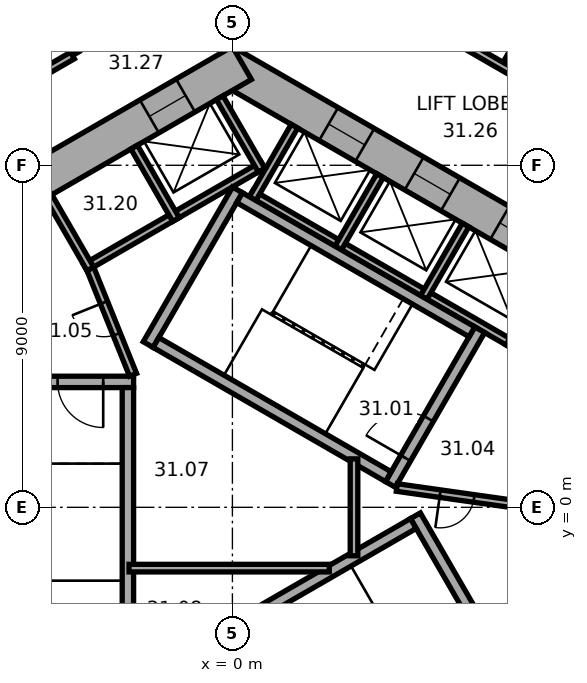
"""IFC4 building model, lengths in metres.
Left out: names, types, materials, properties, quantities, classifications, styles, units other than length and angle.
Written with IfcOpenShell. Run it as: python <this file> out.ifc"""

import sys

from ifc_helpers import new_model, si_unit, direction, frame, frame_2d, origin, place, context, subcontext, project, spatial, rectangle, extrude, element, fill, save


model = new_model("IFC4")
c1 = context("Model", 3, precision=1e-05, world=origin(), true_north=direction((0.0, 1.0)))
c2 = subcontext(c1, "Body", "Model", "MODEL_VIEW")
j1 = project(units=[si_unit("LENGTHUNIT", "METRE"), si_unit("PLANEANGLEUNIT", "RADIAN")], contexts=[c1])
p1 = place(None, origin())
s1 = spatial("IfcSite", under=j1, at=p1, CompositionType="ELEMENT")
p2 = place(p1, origin())
s2 = spatial("IfcBuilding", under=s1, at=p2, CompositionType="ELEMENT")
p3 = place(p2, frame((0.0, 0.0, 128.1)))
s3 = spatial("IfcBuildingStorey", under=s2, at=p3, CompositionType="ELEMENT", Elevation=128.1)
p4 = place(p3, frame((10.25, 5.629, 0.0), z_axis=(0.0, 0.0, 1.0), x_axis=(-0.866022616891, 0.50000482701, 0.0)))
e1 = element("IfcWall", 1, at=p4, inside=s3, PredefinedType="SHEAR", context=c2, shape_type="SweptSolid", body=[
    extrude(rectangle(XDim=12.125, YDim=1.0, at=frame_2d((6.062, 0.0))), origin(), (0.0, 0.0, 1.0), 3.7),
])
p5 = place(p4, frame((2.612, 0.0, 0.0)))
e2 = element("IfcOpeningElement", 2, at=p5, cuts=e1, PredefinedType="OPENING", context=c2, shape_type="SweptSolid", body=[
    extrude(rectangle(XDim=1.1, YDim=2.1, at=frame_2d((0.55, 1.05))), frame((0.0, 0.51, 0.0), z_axis=(0.0, -1.0, 0.0), x_axis=(1.0, 0.0, 0.0)), (0.0, 0.0, 1.0), 1.02),
])
p6 = place(p4, frame((5.212, 0.0, 0.0)))
e3 = element("IfcOpeningElement", 3, at=p6, cuts=e1, PredefinedType="OPENING", context=c2, shape_type="SweptSolid", body=[
    extrude(rectangle(XDim=1.1, YDim=2.1, at=frame_2d((0.55, 1.05))), frame((0.0, 0.51, 0.0), z_axis=(0.0, -1.0, 0.0), x_axis=(1.0, 0.0, 0.0)), (0.0, 0.0, 1.0), 1.02),
])
p7 = place(p4, frame((7.812, 0.0, 0.0)))
e4 = element("IfcOpeningElement", 4, at=p7, cuts=e1, PredefinedType="OPENING", context=c2, shape_type="SweptSolid", body=[
    extrude(rectangle(XDim=1.1, YDim=2.1, at=frame_2d((0.55, 1.05))), frame((0.0, 0.51, 0.0), z_axis=(0.0, -1.0, 0.0), x_axis=(1.0, 0.0, 0.0)), (0.0, 0.0, 1.0), 1.02),
])
p8 = place(p3, frame((0.25, 11.691, 0.0), z_axis=(0.0, 0.0, 1.0), x_axis=(-0.866022616891, -0.50000482701, 0.0)))
e5 = element("IfcWall", 5, at=p8, inside=s3, PredefinedType="SHEAR", context=c2, shape_type="SweptSolid", body=[
    extrude(rectangle(XDim=12.125, YDim=1.0, at=frame_2d((6.062, 0.0))), origin(), (0.0, 0.0, 1.0), 3.7),
])
p9 = place(p8, frame((6.262, 0.0, 0.0)))
e6 = element("IfcOpeningElement", 6, at=p9, cuts=e5, PredefinedType="OPENING", context=c2, shape_type="SweptSolid", body=[
    extrude(rectangle(XDim=1.5, YDim=2.1, at=frame_2d((0.75, 1.05))), frame((0.0, 0.51, 0.0), z_axis=(0.0, -1.0, 0.0), x_axis=(1.0, 0.0, 0.0)), (0.0, 0.0, 1.0), 1.02),
])
p10 = place(p8, frame((1.712, 0.0, 0.0)))
e7 = element("IfcOpeningElement", 7, at=p10, cuts=e5, PredefinedType="OPENING", context=c2, shape_type="SweptSolid", body=[
    extrude(rectangle(XDim=1.1, YDim=2.1, at=frame_2d((0.55, 1.05))), frame((0.0, 0.51, 0.0), z_axis=(0.0, -1.0, 0.0), x_axis=(1.0, 0.0, 0.0)), (0.0, 0.0, 1.0), 1.02),
])
p11 = place(p3, frame((7.424, 4.259, 0.0), z_axis=(0.0, 0.0, 1.0), x_axis=(-0.866026010844, 0.49999894854, 0.0)))
e8 = element("IfcWall", 8, at=p11, inside=s3, PredefinedType="PARTITIONING", context=c2, shape_type="SweptSolid", body=[
    extrude(rectangle(XDim=8.0, YDim=0.2, at=frame_2d((4.0, 0.0))), origin(), (0.0, 0.0, 1.0), 3.42),
])
for number, where, z_axis, x_axis in (
    (9, (7.287, 4.222, 0.0), (0.0, 0.0, 1.0), (0.5, 0.866, 0.0)),
    (10, (5.036, 5.522, 0.0), (0.0, 0.0, 1.0), (0.5, 0.866, 0.0)),
    (11, (2.784, 6.822, 0.0), (0.0, 0.0, 1.0), (0.5, 0.866, 0.0)),
    (12, (0.532, 8.122, 0.0), (0.0, 0.0, 1.0), (0.5, 0.866, 0.0)),
):
    element("IfcWall", number, at=place(p3, frame(where, z_axis=z_axis, x_axis=x_axis)), inside=s3, PredefinedType="PARTITIONING", context=c2, shape_type="SweptSolid", body=[
        extrude(rectangle(XDim=2.2, YDim=0.2, at=frame_2d((1.1, 0.0))), origin(), (0.0, 0.0, 1.0), 3.42),
    ])
p12 = place(p3, frame((0.803, 9.009, 0.0), z_axis=(0.0, 0.0, 1.0), x_axis=(-0.866028230842, -0.499995103361, 0.0)))
e13 = element("IfcWall", 13, at=p12, inside=s3, PredefinedType="PARTITIONING", context=c2, shape_type="SweptSolid", body=[
    extrude(rectangle(XDim=5.4, YDim=0.2, at=frame_2d((2.7, 0.0))), origin(), (0.0, 0.0, 1.0), 3.42),
])
p13 = place(p3, frame((0.767, 8.872, 0.0), z_axis=(0.0, 0.0, 1.0), x_axis=(-0.499994660107, 0.866028486751, 0.0)))
e14 = element("IfcWall", 14, at=p13, inside=s3, PredefinedType="PARTITIONING", context=c2, shape_type="SweptSolid", body=[
    extrude(rectangle(XDim=2.2, YDim=0.2, at=frame_2d((1.1, 0.0))), origin(), (0.0, 0.0, 1.0), 3.42),
])
for number, where, z_axis, x_axis in (
    (15, (-1.485, 7.572, 0.0), (0.0, 0.0, 1.0), (-0.5, 0.866, 0.0)),
    (16, (-3.737, 6.272, 0.0), (0.0, 0.0, 1.0), (-0.5, 0.866, 0.0)),
):
    element("IfcWall", number, at=place(p3, frame(where, z_axis=z_axis, x_axis=x_axis)), inside=s3, PredefinedType="PARTITIONING", context=c2, shape_type="SweptSolid", body=[
        extrude(rectangle(XDim=2.2, YDim=0.2, at=frame_2d((1.1, 0.0))), origin(), (0.0, 0.0, 1.0), 3.42),
    ])
p14 = place(p3, frame((4.158, 0.602, 0.0), z_axis=(0.0, 0.0, 1.0), x_axis=(0.499977259774, 0.866038532462, 0.0)))
e17 = element("IfcWall", 17, at=p14, inside=s3, PredefinedType="SHEAR", context=c2, shape_type="SweptSolid", body=[
    extrude(rectangle(XDim=4.7, YDim=0.3, at=frame_2d((2.35, 0.0))), origin(), (0.0, 0.0, 1.0), 3.42),
])
p15 = place(p14, frame((0.8, 0.0, 0.0)))
e18 = element("IfcOpeningElement", 18, at=p15, cuts=e17, PredefinedType="OPENING", context=c2, shape_type="SweptSolid", body=[
    extrude(rectangle(XDim=1.2, YDim=2.1, at=frame_2d((0.6, 1.05))), frame((0.0, 0.16, 0.0), z_axis=(0.0, -1.0, 0.0), x_axis=(1.0, 0.0, 0.0)), (0.0, 0.0, 1.0), 0.32),
])
p16 = place(p3, frame((-2.216, 4.282, 0.0), z_axis=(0.0, 0.0, 1.0), x_axis=(0.499977259774, 0.866038532462, 0.0)))
e19 = element("IfcWall", 19, at=p16, inside=s3, PredefinedType="SHEAR", context=c2, shape_type="SweptSolid", body=[
    extrude(rectangle(XDim=4.7, YDim=0.3, at=frame_2d((2.35, 0.0))), origin(), (0.0, 0.0, 1.0), 3.42),
])
for number, where, z_axis, x_axis in (
    (20, (4.103, 0.807, 0.0), (0.0, 0.0, 1.0), (-0.866, 0.5, 0.0)),
    (21, (6.303, 4.617, 0.0), (0.0, 0.0, 1.0), (-0.866, 0.5, 0.0)),
):
    element("IfcWall", number, at=place(p3, frame(where, z_axis=z_axis, x_axis=x_axis)), inside=s3, PredefinedType="SHEAR", context=c2, shape_type="SweptSolid", body=[
        extrude(rectangle(XDim=7.06, YDim=0.3, at=frame_2d((3.53, 0.0))), origin(), (0.0, 0.0, 1.0), 3.42),
    ])
p17 = place(p3, frame((-2.6, 3.3, 0.0), z_axis=(0.0, 0.0, 1.0), x_axis=(-1.0, 0.0, 0.0)))
e22 = element("IfcWall", 22, at=p17, inside=s3, PredefinedType="SHEAR", context=c2, shape_type="SweptSolid", body=[
    extrude(rectangle(XDim=4.7, YDim=0.3, at=frame_2d((2.35, 0.0))), origin(), (0.0, 0.0, 1.0), 3.42),
])
p18 = place(p17, frame((0.8, 0.0, 0.0)))
e23 = element("IfcOpeningElement", 23, at=p18, cuts=e22, PredefinedType="OPENING", context=c2, shape_type="SweptSolid", body=[
    extrude(rectangle(XDim=1.2, YDim=2.1, at=frame_2d((0.6, 1.05))), frame((0.0, 0.16, 0.0), z_axis=(0.0, -1.0, 0.0), x_axis=(1.0, 0.0, 0.0)), (0.0, 0.0, 1.0), 0.32),
])
p19 = place(p3, frame((-2.75, 3.15, 0.0), z_axis=(0.0, 0.0, 1.0), x_axis=(0.0, -1.0, 0.0)))
e24 = element("IfcWall", 24, at=p19, inside=s3, PredefinedType="SHEAR", context=c2, shape_type="SweptSolid", body=[
    extrude(rectangle(XDim=7.06, YDim=0.3, at=frame_2d((3.53, 0.0))), origin(), (0.0, 0.0, 1.0), 3.42),
])
p20 = place(p3, frame((4.816, -0.222, 0.0), z_axis=(0.0, 0.0, 1.0), x_axis=(0.499977259774, -0.866038532462, 0.0)))
e25 = element("IfcWall", 25, at=p20, inside=s3, PredefinedType="SHEAR", context=c2, shape_type="SweptSolid", body=[
    extrude(rectangle(XDim=4.7, YDim=0.3, at=frame_2d((2.35, 0.0))), origin(), (0.0, 0.0, 1.0), 3.42),
])
p21 = place(p3, frame((-1.353, -3.957, 0.0), z_axis=(0.0, 0.0, 1.0), x_axis=(0.866027801685, 0.499995846692, 0.0)))
e26 = element("IfcWall", 26, at=p21, inside=s3, PredefinedType="SHEAR", context=c2, shape_type="SweptSolid", body=[
    extrude(rectangle(XDim=7.06, YDim=0.3, at=frame_2d((3.53, 0.0))), origin(), (0.0, 0.0, 1.0), 3.42),
])
p22 = place(p3, frame((4.327, 0.521, 0.0), z_axis=(0.0, 0.0, 1.0), x_axis=(0.990124376366, -0.14019172346, 0.0)))
e27 = element("IfcWall", 27, at=p22, inside=s3, PredefinedType="PARTITIONING", context=c2, shape_type="SweptSolid", body=[
    extrude(rectangle(XDim=3.002, YDim=0.2, at=frame_2d((1.501, 0.0))), origin(), (0.0, 0.0, 1.0), 3.42),
])
p23 = place(p22, frame((1.15, 0.0, 0.0)))
e28 = element("IfcOpeningElement", 28, at=p23, cuts=e27, PredefinedType="OPENING", context=c2, shape_type="SweptSolid", body=[
    extrude(rectangle(XDim=0.9, YDim=2.1, at=frame_2d((0.45, 1.05))), frame((0.0, 0.11, 0.0), z_axis=(0.0, -1.0, 0.0), x_axis=(1.0, 0.0, 0.0)), (0.0, 0.0, 1.0), 0.22),
])
p24 = place(p3, frame((-2.615, 3.487, 0.0), z_axis=(0.0, 0.0, 1.0), x_axis=(-0.373576831041, 0.92759924068, 0.0)))
e29 = element("IfcWall", 29, at=p24, inside=s3, PredefinedType="PARTITIONING", context=c2, shape_type="SweptSolid", body=[
    extrude(rectangle(XDim=3.002, YDim=0.2, at=frame_2d((1.501, 0.0))), origin(), (0.0, 0.0, 1.0), 3.42),
])
p25 = place(p24, frame((1.15, 0.0, 0.0)))
e30 = element("IfcOpeningElement", 30, at=p25, cuts=e29, PredefinedType="OPENING", context=c2, shape_type="SweptSolid", body=[
    extrude(rectangle(XDim=0.9, YDim=2.1, at=frame_2d((0.45, 1.05))), frame((0.0, 0.11, 0.0), z_axis=(0.0, -1.0, 0.0), x_axis=(1.0, 0.0, 0.0)), (0.0, 0.0, 1.0), 0.22),
])
p26 = place(p3, frame((-2.72, -1.6, 0.0), z_axis=(0.0, 0.0, 1.0), x_axis=(1.0, 0.0, 0.0)))
e31 = element("IfcWall", 31, at=p26, inside=s3, PredefinedType="PARTITIONING", context=c2, shape_type="SweptSolid", body=[
    extrude(rectangle(XDim=5.269, YDim=0.2, at=frame_2d((2.634, 0.0))), origin(), (0.0, 0.0, 1.0), 3.42),
])
p27 = place(p3, frame((3.2, -1.275, 0.0), z_axis=(0.0, 0.0, 1.0), x_axis=(0.0, 1.0, 0.0)))
e32 = element("IfcWall", 32, at=p27, inside=s3, PredefinedType="PARTITIONING", context=c2, shape_type="SweptSolid", body=[
    extrude(rectangle(XDim=2.549, YDim=0.2, at=frame_2d((1.275, 0.0))), origin(), (0.0, 0.0, 1.0), 3.42),
])
p28 = place(p3, frame((-4.723, 12.978, 0.0), z_axis=(0.0, 0.0, 1.0), x_axis=(0.500074377092, -0.865982457891, 0.0)))
e33 = element("IfcWall", 33, at=p28, inside=s3, PredefinedType="PARTITIONING", context=c2, shape_type="SweptSolid", body=[
    extrude(rectangle(XDim=1.201, YDim=0.2, at=frame_2d((0.601, 0.0))), origin(), (0.0, 0.0, 1.0), 3.42),
])
p29 = place(p3, frame((-4.209, 11.888, 0.0), z_axis=(0.0, 0.0, 1.0), x_axis=(-0.866020930448, -0.500007747966, 0.0)))
e34 = element("IfcWall", 34, at=p29, inside=s3, PredefinedType="PARTITIONING", context=c2, shape_type="SweptSolid", body=[
    extrude(rectangle(XDim=8.321, YDim=0.2, at=frame_2d((4.161, 0.0))), origin(), (0.0, 0.0, 1.0), 3.42),
])
p30 = place(p29, frame((3.031, 0.0, 0.0)))
e35 = element("IfcOpeningElement", 35, at=p30, cuts=e34, PredefinedType="OPENING", context=c2, shape_type="SweptSolid", body=[
    extrude(rectangle(XDim=1.0, YDim=2.1, at=frame_2d((0.5, 1.05))), frame((0.0, 0.11, 0.0), z_axis=(0.0, -1.0, 0.0), x_axis=(1.0, 0.0, 0.0)), (0.0, 0.0, 1.0), 0.22),
])
p31 = place(p3, frame((8.394, 13.792, 0.0), z_axis=(0.0, 0.0, 1.0), x_axis=(-0.500002508028, -0.866023955769, 0.0)))
e36 = element("IfcWall", 36, at=p31, inside=s3, PredefinedType="PARTITIONING", context=c2, shape_type="SweptSolid", body=[
    extrude(rectangle(XDim=2.44, YDim=0.12, at=frame_2d((1.22, 0.0))), origin(), (0.0, 0.0, 1.0), 3.42),
])
p32 = place(p31, frame((0.77, 0.0, 0.0)))
e37 = element("IfcOpeningElement", 37, at=p32, cuts=e36, PredefinedType="OPENING", context=c2, shape_type="SweptSolid", body=[
    extrude(rectangle(XDim=0.9, YDim=2.1, at=frame_2d((0.45, 1.05))), frame((0.0, 0.07, 0.0), z_axis=(0.0, -1.0, 0.0), x_axis=(1.0, 0.0, 0.0)), (0.0, 0.0, 1.0), 0.14),
])
p33 = place(p3, frame((11.646, 8.981, 0.0), z_axis=(0.0, 0.0, 1.0), x_axis=(-0.866027142779, 0.499996987961, 0.0)))
e38 = element("IfcWall", 38, at=p33, inside=s3, PredefinedType="PARTITIONING", context=c2, shape_type="SweptSolid", body=[
    extrude(rectangle(XDim=9.597, YDim=0.2, at=frame_2d((4.798, 0.0))), origin(), (0.0, 0.0, 1.0), 3.42),
])
p34 = place(p33, frame((2.086, 0.0, 0.0)))
e39 = element("IfcOpeningElement", 39, at=p34, cuts=e38, PredefinedType="OPENING", context=c2, shape_type="SweptSolid", body=[
    extrude(rectangle(XDim=1.0, YDim=2.1, at=frame_2d((0.5, 1.05))), frame((0.0, 0.11, 0.0), z_axis=(0.0, -1.0, 0.0), x_axis=(1.0, 0.0, 0.0)), (0.0, 0.0, 1.0), 0.22),
])
p35 = place(p33, frame((8.01, 0.0, 0.0)))
e40 = element("IfcOpeningElement", 40, at=p35, cuts=e38, PredefinedType="OPENING", context=c2, shape_type="SweptSolid", body=[
    extrude(rectangle(XDim=1.0, YDim=2.1, at=frame_2d((0.5, 1.05))), frame((0.0, 0.11, 0.0), z_axis=(0.0, -1.0, 0.0), x_axis=(1.0, 0.0, 0.0)), (0.0, 0.0, 1.0), 0.22),
])
p36 = place(p15, origin())
e41 = element("IfcDoor", 41, at=p36, inside=s3, OperationType="SINGLE_SWING_RIGHT", PredefinedType="DOOR", context=c2, shape_type="SweptSolid", body=[
    extrude(rectangle(XDim=1.2, YDim=2.1, at=frame_2d((0.6, 1.05))), frame((0.0, 0.025, 0.0), z_axis=(0.0, -1.0, 0.0), x_axis=(1.0, 0.0, 0.0)), (0.0, 0.0, 1.0), 0.05),
])
fill(e18, e41)
p37 = place(p18, origin())
e42 = element("IfcDoor", 42, at=p37, inside=s3, OperationType="SINGLE_SWING_RIGHT", PredefinedType="DOOR", context=c2, shape_type="SweptSolid", body=[
    extrude(rectangle(XDim=1.2, YDim=2.1, at=frame_2d((0.6, 1.05))), frame((0.0, 0.025, 0.0), z_axis=(0.0, -1.0, 0.0), x_axis=(1.0, 0.0, 0.0)), (0.0, 0.0, 1.0), 0.05),
])
fill(e23, e42)
p38 = place(p23, origin())
e43 = element("IfcDoor", 43, at=p38, inside=s3, OperationType="SINGLE_SWING_LEFT", PredefinedType="DOOR", context=c2, shape_type="SweptSolid", body=[
    extrude(rectangle(XDim=0.9, YDim=2.1, at=frame_2d((0.45, 1.05))), frame((0.0, 0.025, 0.0), z_axis=(0.0, -1.0, 0.0), x_axis=(1.0, 0.0, 0.0)), (0.0, 0.0, 1.0), 0.05),
])
fill(e28, e43)
p39 = place(p25, origin())
e44 = element("IfcDoor", 44, at=p39, inside=s3, OperationType="SINGLE_SWING_LEFT", PredefinedType="DOOR", context=c2, shape_type="SweptSolid", body=[
    extrude(rectangle(XDim=0.9, YDim=2.1, at=frame_2d((0.45, 1.05))), frame((0.0, 0.025, 0.0), z_axis=(0.0, -1.0, 0.0), x_axis=(1.0, 0.0, 0.0)), (0.0, 0.0, 1.0), 0.05),
])
fill(e30, e44)
p40 = place(p5, origin())
e45 = element("IfcDoor", 45, at=p40, inside=s3, OperationType="DOUBLE_DOOR_SLIDING", PredefinedType="DOOR", context=c2, shape_type="SweptSolid", body=[
    extrude(rectangle(XDim=1.1, YDim=2.1, at=frame_2d((0.55, 1.05))), frame((0.0, 0.025, 0.0), z_axis=(0.0, -1.0, 0.0), x_axis=(1.0, 0.0, 0.0)), (0.0, 0.0, 1.0), 0.05),
])
fill(e2, e45)
p41 = place(p6, origin())
e46 = element("IfcDoor", 46, at=p41, inside=s3, OperationType="DOUBLE_DOOR_SLIDING", PredefinedType="DOOR", context=c2, shape_type="SweptSolid", body=[
    extrude(rectangle(XDim=1.1, YDim=2.1, at=frame_2d((0.55, 1.05))), frame((0.0, 0.025, 0.0), z_axis=(0.0, -1.0, 0.0), x_axis=(1.0, 0.0, 0.0)), (0.0, 0.0, 1.0), 0.05),
])
fill(e3, e46)
p42 = place(p7, origin())
e47 = element("IfcDoor", 47, at=p42, inside=s3, OperationType="DOUBLE_DOOR_SLIDING", PredefinedType="DOOR", context=c2, shape_type="SweptSolid", body=[
    extrude(rectangle(XDim=1.1, YDim=2.1, at=frame_2d((0.55, 1.05))), frame((0.0, 0.025, 0.0), z_axis=(0.0, -1.0, 0.0), x_axis=(1.0, 0.0, 0.0)), (0.0, 0.0, 1.0), 0.05),
])
fill(e4, e47)
p43 = place(p10, origin())
e48 = element("IfcDoor", 48, at=p43, inside=s3, OperationType="DOUBLE_DOOR_SLIDING", PredefinedType="DOOR", context=c2, shape_type="SweptSolid", body=[
    extrude(rectangle(XDim=1.1, YDim=2.1, at=frame_2d((0.55, 1.05))), frame((0.0, 0.025, 0.0), z_axis=(0.0, -1.0, 0.0), x_axis=(1.0, 0.0, 0.0)), (0.0, 0.0, 1.0), 0.05),
])
fill(e7, e48)
save(model, sys.argv[1])
